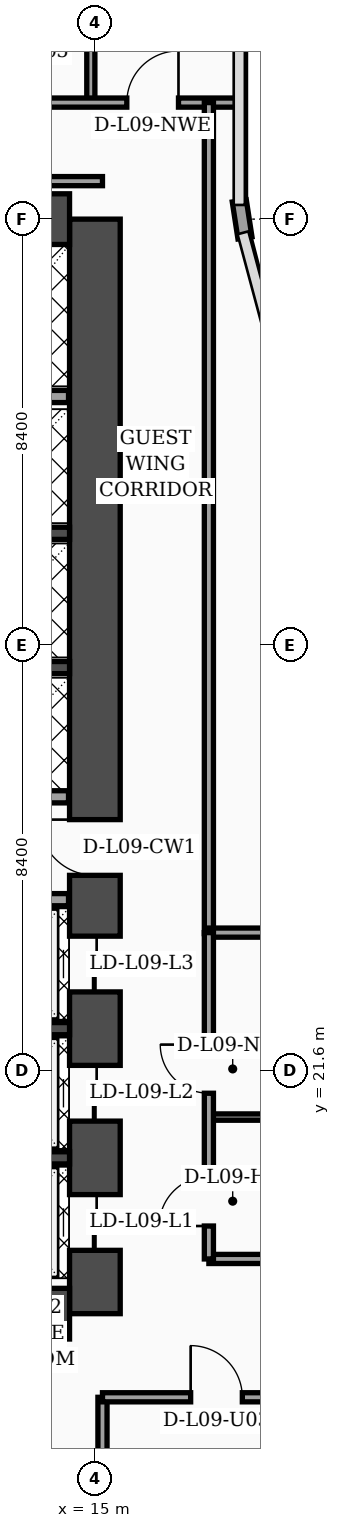
"""IFC4 building model, lengths in metres.
Left out: names, types, materials, properties, quantities, classifications, styles, units other than length and angle.
Written with IfcOpenShell. Run it as: python <this file> out.ifc"""

import sys

from ifc_helpers import new_model, si_unit, direction, frame, frame_2d, origin, place, context, subcontext, project, spatial, rectangle, extrude, element, fill, save


model = new_model("IFC4")
c1 = context("Model", 3, precision=1e-05, world=origin(), true_north=direction((0.0, 1.0)))
c2 = subcontext(c1, "Body", "Model", "MODEL_VIEW")
j1 = project(units=[si_unit("LENGTHUNIT", "METRE"), si_unit("PLANEANGLEUNIT", "RADIAN")], contexts=[c1])
p1 = place(None, origin())
s1 = spatial("IfcSite", under=j1, at=p1, CompositionType="ELEMENT")
p2 = place(p1, origin())
s2 = spatial("IfcBuilding", under=s1, at=p2, CompositionType="ELEMENT")
p3 = place(p2, frame((0.0, 0.0, 42.2)))
s3 = spatial("IfcBuildingStorey", under=s2, at=p3, CompositionType="ELEMENT", Elevation=42.2)
p4 = place(p3, frame((15.0, 16.8, 0.0), z_axis=(0.0, 0.0, 1.0), x_axis=(0.0, 1.0, 0.0)))
e1 = element("IfcWall", 1, at=p4, inside=s3, PredefinedType="SHEAR", context=c2, shape_type="SweptSolid", body=[
    extrude(rectangle(XDim=21.6, YDim=1.0, at=frame_2d((10.8, 0.0))), origin(), (0.0, 0.0, 1.0), 3.52),
])
p5 = place(p4, frame((8.65, 0.0, 0.0)))
e2 = element("IfcOpeningElement", 2, at=p5, cuts=e1, PredefinedType="OPENING", context=c2, shape_type="SweptSolid", body=[
    extrude(rectangle(XDim=1.1, YDim=2.2, at=frame_2d((0.55, 1.1))), frame((0.0, 0.51, 0.0), z_axis=(0.0, -1.0, 0.0), x_axis=(1.0, 0.0, 0.0)), (0.0, 0.0, 1.0), 1.02),
])
p6 = place(p4, frame((1.25, 0.0, 0.0)))
e3 = element("IfcOpeningElement", 3, at=p6, cuts=e1, PredefinedType="OPENING", context=c2, shape_type="SweptSolid", body=[
    extrude(rectangle(XDim=1.1, YDim=2.2, at=frame_2d((0.55, 1.1))), frame((0.0, 0.51, 0.0), z_axis=(0.0, -1.0, 0.0), x_axis=(1.0, 0.0, 0.0)), (0.0, 0.0, 1.0), 1.02),
])
p7 = place(p4, frame((3.8, 0.0, 0.0)))
e4 = element("IfcOpeningElement", 4, at=p7, cuts=e1, PredefinedType="OPENING", context=c2, shape_type="SweptSolid", body=[
    extrude(rectangle(XDim=1.1, YDim=2.2, at=frame_2d((0.55, 1.1))), frame((0.0, 0.51, 0.0), z_axis=(0.0, -1.0, 0.0), x_axis=(1.0, 0.0, 0.0)), (0.0, 0.0, 1.0), 1.02),
])
p8 = place(p4, frame((6.35, 0.0, 0.0)))
e5 = element("IfcOpeningElement", 5, at=p8, cuts=e1, PredefinedType="OPENING", context=c2, shape_type="SweptSolid", body=[
    extrude(rectangle(XDim=1.1, YDim=2.2, at=frame_2d((0.55, 1.1))), frame((0.0, 0.51, 0.0), z_axis=(0.0, -1.0, 0.0), x_axis=(1.0, 0.0, 0.0)), (0.0, 0.0, 1.0), 1.02),
])
for number, where, z_axis, x_axis in (
    (6, (4.7, 38.4, 0.0), (0.0, 0.0, 1.0), (1.0, 0.0, 0.0)),
    (7, (4.7, 16.8, 0.0), (0.0, 0.0, 1.0), (1.0, 0.0, 0.0)),
):
    element("IfcWall", number, at=place(p3, frame(where, z_axis=z_axis, x_axis=x_axis)), inside=s3, PredefinedType="SHEAR", context=c2, shape_type="SweptSolid", body=[
        extrude(rectangle(XDim=9.8, YDim=1.0, at=frame_2d((4.9, 0.0))), origin(), (0.0, 0.0, 1.0), 3.52),
    ])
for number, where, z_axis, x_axis in (
    (8, (12.18, 19.875, 0.0), (0.0, 0.0, 1.0), (1.0, 0.0, 0.0)),
    (9, (12.18, 22.425, 0.0), (0.0, 0.0, 1.0), (1.0, 0.0, 0.0)),
    (10, (12.18, 29.55, 0.0), (0.0, 0.0, 1.0), (1.0, 0.0, 0.0)),
    (11, (12.18, 32.2, 0.0), (0.0, 0.0, 1.0), (1.0, 0.0, 0.0)),
):
    element("IfcWall", number, at=place(p3, frame(where, z_axis=z_axis, x_axis=x_axis)), inside=s3, PredefinedType="SOLIDWALL", context=c2, shape_type="SweptSolid", body=[
        extrude(rectangle(XDim=2.32, YDim=0.24, at=frame_2d((1.16, 0.0))), origin(), (0.0, 0.0, 1.0), 3.52),
    ])
p9 = place(p3, frame((17.962, 38.03, 0.0), z_axis=(0.0, 0.0, 1.0), x_axis=(-0.15141125477, 0.988470855377, 0.0)))
e12 = element("IfcWall", 12, at=p9, inside=s3, PredefinedType="SOLIDWALL", context=c2, shape_type="SweptSolid", body=[
    extrude(rectangle(XDim=0.739, YDim=0.28, at=frame_2d((0.369, 0.0))), origin(), (0.0, 0.0, 1.0), 3.52),
])
p10 = place(p3, frame((12.15, 24.97, 0.0), z_axis=(0.0, 0.0, 1.0), x_axis=(1.0, 0.0, 0.0)))
e13 = element("IfcWall", 13, at=p10, inside=s3, PredefinedType="SOLIDWALL", context=c2, shape_type="SweptSolid", body=[
    extrude(rectangle(XDim=2.33, YDim=0.24, at=frame_2d((1.165, 0.0))), origin(), (0.0, 0.0, 1.0), 2.82),
])
p11 = place(p3, frame((12.25, 27.0, 0.0), z_axis=(0.0, 0.0, 1.0), x_axis=(1.0, 0.0, 0.0)))
e14 = element("IfcWall", 14, at=p11, inside=s3, PredefinedType="SOLIDWALL", context=c2, shape_type="SweptSolid", body=[
    extrude(rectangle(XDim=2.23, YDim=0.24, at=frame_2d((1.115, 0.0))), origin(), (0.0, 0.0, 1.0), 3.52),
])
p12 = place(p3, frame((9.66, 34.9, 0.0), z_axis=(0.0, 0.0, 1.0), x_axis=(1.0, 0.0, 0.0)))
e15 = element("IfcWall", 15, at=p12, inside=s3, PredefinedType="SOLIDWALL", context=c2, shape_type="SweptSolid", body=[
    extrude(rectangle(XDim=4.82, YDim=0.24, at=frame_2d((2.41, 0.0))), origin(), (0.0, 0.0, 1.0), 3.52),
])
p13 = place(p3, frame((15.15, 2.44, 0.0), z_axis=(0.0, 0.0, 1.0), x_axis=(0.0, 1.0, 0.0)))
e16 = element("IfcWall", 16, at=p13, inside=s3, PredefinedType="PARTITIONING", context=c2, shape_type="SweptSolid", body=[
    extrude(rectangle(XDim=12.71, YDim=0.18, at=frame_2d((6.355, 0.0))), origin(), (0.0, 0.0, 1.0), 3.02),
])
p14 = place(p3, frame((15.15, 15.15, 0.0), z_axis=(0.0, 0.0, 1.0), x_axis=(1.0, 0.0, 0.0)))
e17 = element("IfcWall", 17, at=p14, inside=s3, PredefinedType="PARTITIONING", context=c2, shape_type="SweptSolid", body=[
    extrude(rectangle(XDim=6.45, YDim=0.18, at=frame_2d((3.225, 0.0))), origin(), (0.0, 0.0, 1.0), 2.32),
])
p15 = place(p14, frame((1.74, 0.0, 0.0)))
e18 = element("IfcOpeningElement", 18, at=p15, cuts=e17, PredefinedType="OPENING", context=c2, shape_type="SweptSolid", body=[
    extrude(rectangle(XDim=1.02, YDim=2.2, at=frame_2d((0.51, 1.1))), frame((0.0, 0.1, 0.0), z_axis=(0.0, -1.0, 0.0), x_axis=(1.0, 0.0, 0.0)), (0.0, 0.0, 1.0), 0.2),
])
p16 = place(p3, frame((14.92, 40.7, 0.0), z_axis=(0.0, 0.0, 1.0), x_axis=(0.0, 1.0, 0.0)))
e19 = element("IfcWall", 19, at=p16, inside=s3, PredefinedType="PARTITIONING", context=c2, shape_type="SweptSolid", body=[
    extrude(rectangle(XDim=7.1, YDim=0.16, at=frame_2d((3.55, 0.0))), origin(), (0.0, 0.0, 1.0), 3.02),
])
p17 = place(p3, frame((0.08, 40.7, 0.0), z_axis=(0.0, 0.0, 1.0), x_axis=(1.0, 0.0, 0.0)))
e20 = element("IfcWall", 20, at=p17, inside=s3, PredefinedType="PARTITIONING", context=c2, shape_type="SweptSolid", body=[
    extrude(rectangle(XDim=17.77, YDim=0.18, at=frame_2d((8.885, 0.0))), origin(), (0.0, 0.0, 1.0), 2.82),
])
p18 = place(p17, frame((0.9, 0.0, 0.0)))
e21 = element("IfcOpeningElement", 21, at=p18, cuts=e20, PredefinedType="OPENING", context=c2, shape_type="SweptSolid", body=[
    extrude(rectangle(XDim=1.02, YDim=2.2, at=frame_2d((0.51, 1.1))), frame((0.0, 0.1, 0.0), z_axis=(0.0, -1.0, 0.0), x_axis=(1.0, 0.0, 0.0)), (0.0, 0.0, 1.0), 0.2),
])
p19 = place(p17, frame((4.45, 0.0, 0.0)))
e22 = element("IfcOpeningElement", 22, at=p19, cuts=e20, PredefinedType="OPENING", context=c2, shape_type="SweptSolid", body=[
    extrude(rectangle(XDim=1.02, YDim=2.2, at=frame_2d((0.51, 1.1))), frame((0.0, 0.1, 0.0), z_axis=(0.0, -1.0, 0.0), x_axis=(1.0, 0.0, 0.0)), (0.0, 0.0, 1.0), 0.2),
])
p20 = place(p17, frame((10.33, 0.0, 0.0)))
e23 = element("IfcOpeningElement", 23, at=p20, cuts=e20, PredefinedType="OPENING", context=c2, shape_type="SweptSolid", body=[
    extrude(rectangle(XDim=1.02, YDim=2.2, at=frame_2d((0.51, 1.1))), frame((0.0, 0.1, 0.0), z_axis=(0.0, -1.0, 0.0), x_axis=(1.0, 0.0, 0.0)), (0.0, 0.0, 1.0), 0.2),
])
p21 = place(p17, frame((15.55, 0.0, 0.0)))
e24 = element("IfcOpeningElement", 24, at=p21, cuts=e20, PredefinedType="OPENING", context=c2, shape_type="SweptSolid", body=[
    extrude(rectangle(XDim=1.02, YDim=2.2, at=frame_2d((0.51, 1.1))), frame((0.0, 0.1, 0.0), z_axis=(0.0, -1.0, 0.0), x_axis=(1.0, 0.0, 0.0)), (0.0, 0.0, 1.0), 0.2),
])
p22 = place(p3, frame((17.25, 24.3, 0.0), z_axis=(0.0, 0.0, 1.0), x_axis=(0.0, 1.0, 0.0)))
e25 = element("IfcWall", 25, at=p22, inside=s3, PredefinedType="PARTITIONING", context=c2, shape_type="SweptSolid", body=[
    extrude(rectangle(XDim=16.4, YDim=0.18, at=frame_2d((8.2, 0.0))), origin(), (0.0, 0.0, 1.0), 2.82),
])
p23 = place(p3, frame((3.68, 39.15, 0.0), z_axis=(0.0, 0.0, 1.0), x_axis=(1.0, 0.0, 0.0)))
e26 = element("IfcWall", 26, at=p23, inside=s3, PredefinedType="PARTITIONING", context=c2, shape_type="SweptSolid", body=[
    extrude(rectangle(XDim=11.47, YDim=0.18, at=frame_2d((5.735, 0.0))), origin(), (0.0, 0.0, 1.0), 2.82),
])
p24 = place(p3, frame((17.25, 17.88, 0.0), z_axis=(0.0, 0.0, 1.0), x_axis=(1.0, 0.0, 0.0)))
e27 = element("IfcWall", 27, at=p24, inside=s3, PredefinedType="PARTITIONING", context=c2, shape_type="SweptSolid", body=[
    extrude(rectangle(XDim=4.3, YDim=0.18, at=frame_2d((2.15, 0.0))), origin(), (0.0, 0.0, 1.0), 3.52),
])
p25 = place(p3, frame((17.25, 20.68, 0.0), z_axis=(0.0, 0.0, 1.0), x_axis=(1.0, 0.0, 0.0)))
e28 = element("IfcWall", 28, at=p25, inside=s3, PredefinedType="PARTITIONING", context=c2, shape_type="SweptSolid", body=[
    extrude(rectangle(XDim=4.3, YDim=0.125, at=frame_2d((2.15, 0.0))), origin(), (0.0, 0.0, 1.0), 3.52),
])
p26 = place(p3, frame((17.25, 24.32, 0.0), z_axis=(0.0, 0.0, 1.0), x_axis=(1.0, 0.0, 0.0)))
e29 = element("IfcWall", 29, at=p26, inside=s3, PredefinedType="PARTITIONING", context=c2, shape_type="SweptSolid", body=[
    extrude(rectangle(XDim=4.35, YDim=0.18, at=frame_2d((2.175, 0.0))), origin(), (0.0, 0.0, 1.0), 3.52),
])
p27 = place(p3, frame((17.25, 17.88, 0.0), z_axis=(0.0, 0.0, 1.0), x_axis=(0.0, 1.0, 0.0)))
e30 = element("IfcWall", 30, at=p27, inside=s3, PredefinedType="PARTITIONING", context=c2, shape_type="SweptSolid", body=[
    extrude(rectangle(XDim=6.44, YDim=0.18, at=frame_2d((3.22, 0.0))), origin(), (0.0, 0.0, 1.0), 3.52),
])
p28 = place(p27, frame((0.65, 0.0, 0.0)))
e31 = element("IfcOpeningElement", 31, at=p28, cuts=e30, PredefinedType="OPENING", context=c2, shape_type="SweptSolid", body=[
    extrude(rectangle(XDim=0.98, YDim=2.15, at=frame_2d((0.49, 1.075))), frame((0.0, 0.1, 0.0), z_axis=(0.0, -1.0, 0.0), x_axis=(1.0, 0.0, 0.0)), (0.0, 0.0, 1.0), 0.2),
])
p29 = place(p27, frame((3.27, 0.0, 0.0)))
e32 = element("IfcOpeningElement", 32, at=p29, cuts=e30, PredefinedType="OPENING", context=c2, shape_type="SweptSolid", body=[
    extrude(rectangle(XDim=0.96, YDim=2.2, at=frame_2d((0.48, 1.1))), frame((0.0, 0.1, 0.0), z_axis=(0.0, -1.0, 0.0), x_axis=(1.0, 0.0, 0.0)), (0.0, 0.0, 1.0), 0.2),
])
p30 = place(p15, origin())
e33 = element("IfcDoor", 33, at=p30, inside=s3, OperationType="SINGLE_SWING_LEFT", PredefinedType="DOOR", context=c2, shape_type="SweptSolid", body=[
    extrude(rectangle(XDim=1.02, YDim=2.2, at=frame_2d((0.51, 1.1))), frame((0.0, 0.025, 0.0), z_axis=(0.0, -1.0, 0.0), x_axis=(1.0, 0.0, 0.0)), (0.0, 0.0, 1.0), 0.05),
])
fill(e18, e33)
p31 = place(p21, origin())
e34 = element("IfcDoor", 34, at=p31, inside=s3, OperationType="SINGLE_SWING_RIGHT", PredefinedType="DOOR", context=c2, shape_type="SweptSolid", body=[
    extrude(rectangle(XDim=1.02, YDim=2.2, at=frame_2d((0.51, 1.1))), frame((0.0, 0.025, 0.0), z_axis=(0.0, -1.0, 0.0), x_axis=(1.0, 0.0, 0.0)), (0.0, 0.0, 1.0), 0.05),
])
fill(e24, e34)
p32 = place(p28, origin())
e35 = element("IfcDoor", 35, at=p32, inside=s3, OperationType="SINGLE_SWING_LEFT", PredefinedType="DOOR", context=c2, shape_type="SweptSolid", body=[
    extrude(rectangle(XDim=0.98, YDim=2.15, at=frame_2d((0.49, 1.075))), frame((0.0, 0.025, 0.0), z_axis=(0.0, -1.0, 0.0), x_axis=(1.0, 0.0, 0.0)), (0.0, 0.0, 1.0), 0.05),
])
fill(e31, e35)
p33 = place(p29, origin())
e36 = element("IfcDoor", 36, at=p33, inside=s3, OperationType="SINGLE_SWING_RIGHT", PredefinedType="DOOR", context=c2, shape_type="SweptSolid", body=[
    extrude(rectangle(XDim=0.96, YDim=2.2, at=frame_2d((0.48, 1.1))), frame((0.0, 0.025, 0.0), z_axis=(0.0, -1.0, 0.0), x_axis=(1.0, 0.0, 0.0)), (0.0, 0.0, 1.0), 0.05),
])
fill(e32, e36)
p34 = place(p5, origin())
e37 = element("IfcDoor", 37, at=p34, inside=s3, OperationType="SINGLE_SWING_RIGHT", PredefinedType="DOOR", context=c2, shape_type="SweptSolid", body=[
    extrude(rectangle(XDim=1.1, YDim=2.2, at=frame_2d((0.55, 1.1))), frame((0.0, 0.025, 0.0), z_axis=(0.0, -1.0, 0.0), x_axis=(1.0, 0.0, 0.0)), (0.0, 0.0, 1.0), 0.05),
])
fill(e2, e37)
p35 = place(p6, origin())
e38 = element("IfcDoor", 38, at=p35, inside=s3, OperationType="DOUBLE_DOOR_SLIDING", PredefinedType="DOOR", context=c2, shape_type="SweptSolid", body=[
    extrude(rectangle(XDim=1.1, YDim=2.2, at=frame_2d((0.55, 1.1))), frame((0.0, 0.025, 0.0), z_axis=(0.0, -1.0, 0.0), x_axis=(1.0, 0.0, 0.0)), (0.0, 0.0, 1.0), 0.05),
])
fill(e3, e38)
p36 = place(p7, origin())
e39 = element("IfcDoor", 39, at=p36, inside=s3, OperationType="DOUBLE_DOOR_SLIDING", PredefinedType="DOOR", context=c2, shape_type="SweptSolid", body=[
    extrude(rectangle(XDim=1.1, YDim=2.2, at=frame_2d((0.55, 1.1))), frame((0.0, 0.025, 0.0), z_axis=(0.0, -1.0, 0.0), x_axis=(1.0, 0.0, 0.0)), (0.0, 0.0, 1.0), 0.05),
])
fill(e4, e39)
p37 = place(p8, origin())
e40 = element("IfcDoor", 40, at=p37, inside=s3, OperationType="DOUBLE_DOOR_SLIDING", PredefinedType="DOOR", context=c2, shape_type="SweptSolid", body=[
    extrude(rectangle(XDim=1.1, YDim=2.2, at=frame_2d((0.55, 1.1))), frame((0.0, 0.025, 0.0), z_axis=(0.0, -1.0, 0.0), x_axis=(1.0, 0.0, 0.0)), (0.0, 0.0, 1.0), 0.05),
])
fill(e5, e40)
save(model, sys.argv[1])
